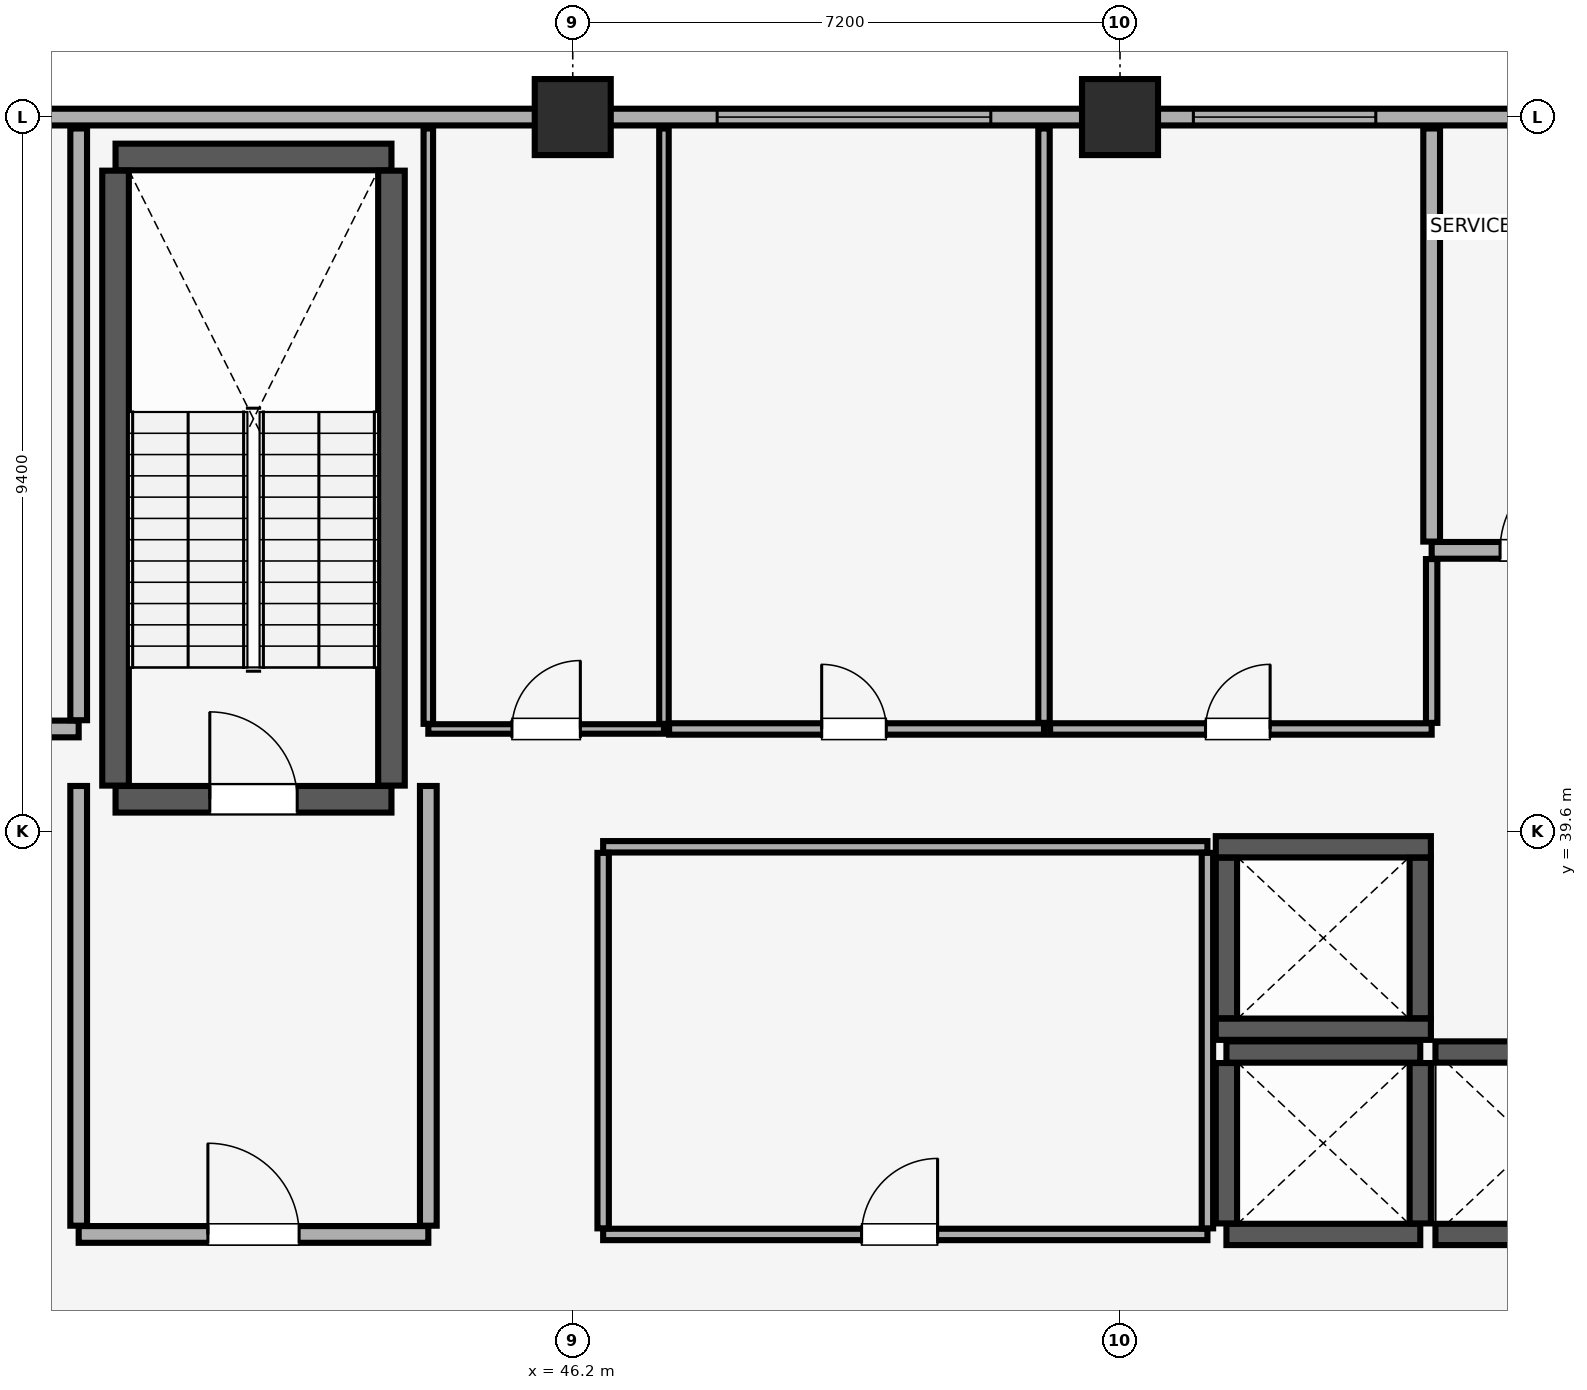
"""IFC4 building model, lengths in metres.
Left out: names, types, materials, properties, quantities, classifications, styles, units other than length and angle.
Written with IfcOpenShell. Run it as: python <this file> out.ifc"""

import sys

from ifc_helpers import new_model, si_unit, direction, frame, frame_2d, origin, origin_2d, place, context, subcontext, project, spatial, rectangle, extrude, element, fill, save


model = new_model("IFC4")
c1 = context("Model", 3, precision=1e-05, world=origin(), true_north=direction((0.0, 1.0)))
c2 = subcontext(c1, "Body", "Model", "MODEL_VIEW")
j1 = project(units=[si_unit("LENGTHUNIT", "METRE"), si_unit("PLANEANGLEUNIT", "RADIAN")], contexts=[c1])
p1 = place(None, origin())
s1 = spatial("IfcSite", under=j1, at=p1, CompositionType="ELEMENT")
p2 = place(p1, origin())
s2 = spatial("IfcBuilding", under=s1, at=p2, CompositionType="ELEMENT")
p3 = place(p2, frame((0.0, 0.0, 285.9)))
s3 = spatial("IfcBuildingStorey", under=s2, at=p3, CompositionType="ELEMENT", Elevation=285.9)
for number, where, z_axis, x_axis in (
    (1, (46.2, 49.0, 0.0), (0.0, 0.0, 1.0), (1.0, 0.0, 0.0)),
    (2, (53.4, 49.0, 0.0), (0.0, 0.0, 1.0), (1.0, 0.0, 0.0)),
):
    element("IfcColumn", number, at=place(p3, frame(where, z_axis=z_axis, x_axis=x_axis)), inside=s3, PredefinedType="COLUMN", context=c2, shape_type="SweptSolid", body=[
        extrude(rectangle(XDim=1.0, YDim=1.0, at=origin_2d()), origin(), (0.0, 0.0, 1.0), 4.1),
    ])
p4 = place(p3, frame((71.4, 49.0, 0.0), z_axis=(0.0, 0.0, 1.0), x_axis=(-1.0, 0.0, 0.0)))
e3 = element("IfcWall", 3, at=p4, inside=s3, PredefinedType="SOLIDWALL", context=c2, shape_type="SweptSolid", body=[
    extrude(rectangle(XDim=58.8, YDim=0.22, at=frame_2d((29.4, 0.0))), origin(), (0.0, 0.0, 1.0), 3.3),
])
p5 = place(p4, frame((56.365, 0.0, 0.85)))
e4 = element("IfcOpeningElement", 4, at=p5, cuts=e3, PredefinedType="OPENING", context=c2, shape_type="SweptSolid", body=[
    extrude(rectangle(XDim=1.5, YDim=1.4, at=frame_2d((0.75, 0.7))), frame((0.0, 0.12, 0.0), z_axis=(0.0, -1.0, 0.0), x_axis=(1.0, 0.0, 0.0)), (0.0, 0.0, 1.0), 0.24),
])
p6 = place(p4, frame((0.935, 0.0, 0.85)))
e5 = element("IfcOpeningElement", 5, at=p6, cuts=e3, PredefinedType="OPENING", context=c2, shape_type="SweptSolid", body=[
    extrude(rectangle(XDim=1.5, YDim=1.4, at=frame_2d((0.75, 0.7))), frame((0.0, 0.12, 0.0), z_axis=(0.0, -1.0, 0.0), x_axis=(1.0, 0.0, 0.0)), (0.0, 0.0, 1.0), 0.24),
])
p7 = place(p4, frame((41.915, 0.0, 0.9)))
e6 = element("IfcOpeningElement", 6, at=p7, cuts=e3, PredefinedType="OPENING", context=c2, shape_type="SweptSolid", body=[
    extrude(rectangle(XDim=3.6, YDim=1.5, at=frame_2d((1.8, 0.75))), frame((0.0, 0.12, 0.0), z_axis=(0.0, -1.0, 0.0), x_axis=(1.0, 0.0, 0.0)), (0.0, 0.0, 1.0), 0.24),
])
p8 = place(p4, frame((36.85, 0.0, 0.9)))
e7 = element("IfcOpeningElement", 7, at=p8, cuts=e3, PredefinedType="OPENING", context=c2, shape_type="SweptSolid", body=[
    extrude(rectangle(XDim=3.0, YDim=1.5, at=frame_2d((1.5, 0.75))), frame((0.0, 0.12, 0.0), z_axis=(0.0, -1.0, 0.0), x_axis=(1.0, 0.0, 0.0)), (0.0, 0.0, 1.0), 0.24),
])
p9 = place(p4, frame((19.7, 0.0, 0.9)))
e8 = element("IfcOpeningElement", 8, at=p9, cuts=e3, PredefinedType="OPENING", context=c2, shape_type="SweptSolid", body=[
    extrude(rectangle(XDim=3.6, YDim=1.5, at=frame_2d((1.8, 0.75))), frame((0.0, 0.12, 0.0), z_axis=(0.0, -1.0, 0.0), x_axis=(1.0, 0.0, 0.0)), (0.0, 0.0, 1.0), 0.24),
])
p10 = place(p4, frame((14.635, 0.0, 0.9)))
e9 = element("IfcOpeningElement", 9, at=p10, cuts=e3, PredefinedType="OPENING", context=c2, shape_type="SweptSolid", body=[
    extrude(rectangle(XDim=2.4, YDim=1.5, at=frame_2d((1.2, 0.75))), frame((0.0, 0.12, 0.0), z_axis=(0.0, -1.0, 0.0), x_axis=(1.0, 0.0, 0.0)), (0.0, 0.0, 1.0), 0.24),
])
p11 = place(p3, frame((40.185, 40.025, 0.0), z_axis=(0.0, 0.0, 1.0), x_axis=(1.0, 0.0, 0.0)))
e10 = element("IfcWall", 10, at=p11, inside=s3, PredefinedType="SHEAR", context=c2, shape_type="SweptSolid", body=[
    extrude(rectangle(XDim=3.63, YDim=0.35, at=frame_2d((1.815, 0.0))), origin(), (0.0, 0.0, 1.0), 4.1),
])
p12 = place(p11, frame((1.24, 0.0, 0.0)))
e11 = element("IfcOpeningElement", 11, at=p12, cuts=e10, PredefinedType="OPENING", context=c2, shape_type="SweptSolid", body=[
    extrude(rectangle(XDim=1.15, YDim=2.15, at=frame_2d((0.575, 1.075))), frame((0.0, 0.185, 0.0), z_axis=(0.0, -1.0, 0.0), x_axis=(1.0, 0.0, 0.0)), (0.0, 0.0, 1.0), 0.37),
])
p13 = place(p3, frame((40.185, 48.475, 0.0), z_axis=(0.0, 0.0, 1.0), x_axis=(1.0, 0.0, 0.0)))
e12 = element("IfcWall", 12, at=p13, inside=s3, PredefinedType="SHEAR", context=c2, shape_type="SweptSolid", body=[
    extrude(rectangle(XDim=3.63, YDim=0.35, at=frame_2d((1.815, 0.0))), origin(), (0.0, 0.0, 1.0), 4.1),
])
for number, where, z_axis, x_axis in (
    (13, (40.185, 40.205, 0.0), (0.0, 0.0, 1.0), (0.0, 1.0, 0.0)),
    (14, (43.815, 40.205, 0.0), (0.0, 0.0, 1.0), (0.0, 1.0, 0.0)),
):
    element("IfcWall", number, at=place(p3, frame(where, z_axis=z_axis, x_axis=x_axis)), inside=s3, PredefinedType="SHEAR", context=c2, shape_type="SweptSolid", body=[
        extrude(rectangle(XDim=8.09, YDim=0.35, at=frame_2d((4.045, 0.0))), origin(), (0.0, 0.0, 1.0), 4.1),
    ])
for number, where, z_axis, x_axis in (
    (15, (54.8, 34.3, 0.0), (0.0, 0.0, 1.0), (1.0, 0.0, 0.0)),
    (16, (54.8, 36.7, 0.0), (0.0, 0.0, 1.0), (1.0, 0.0, 0.0)),
):
    element("IfcWall", number, at=place(p3, frame(where, z_axis=z_axis, x_axis=x_axis)), inside=s3, PredefinedType="SHEAR", context=c2, shape_type="SweptSolid", body=[
        extrude(rectangle(XDim=2.55, YDim=0.28, at=frame_2d((1.275, 0.0))), origin(), (0.0, 0.0, 1.0), 4.1),
    ])
for number, where, z_axis, x_axis in (
    (17, (54.8, 34.445, 0.0), (0.0, 0.0, 1.0), (0.0, 1.0, 0.0)),
    (18, (57.35, 34.445, 0.0), (0.0, 0.0, 1.0), (0.0, 1.0, 0.0)),
):
    element("IfcWall", number, at=place(p3, frame(where, z_axis=z_axis, x_axis=x_axis)), inside=s3, PredefinedType="SHEAR", context=c2, shape_type="SweptSolid", body=[
        extrude(rectangle(XDim=2.11, YDim=0.28, at=frame_2d((1.055, 0.0))), origin(), (0.0, 0.0, 1.0), 4.1),
    ])
for number, where, z_axis, x_axis in (
    (19, (57.55, 34.3, 0.0), (0.0, 0.0, 1.0), (1.0, 0.0, 0.0)),
    (20, (57.55, 36.7, 0.0), (0.0, 0.0, 1.0), (1.0, 0.0, 0.0)),
):
    element("IfcWall", number, at=place(p3, frame(where, z_axis=z_axis, x_axis=x_axis)), inside=s3, PredefinedType="SHEAR", context=c2, shape_type="SweptSolid", body=[
        extrude(rectangle(XDim=2.55, YDim=0.28, at=frame_2d((1.275, 0.0))), origin(), (0.0, 0.0, 1.0), 4.1),
    ])
for number, where, z_axis, x_axis in (
    (21, (54.66, 37.0, 0.0), (0.0, 0.0, 1.0), (1.0, 0.0, 0.0)),
    (22, (54.66, 39.4, 0.0), (0.0, 0.0, 1.0), (1.0, 0.0, 0.0)),
):
    element("IfcWall", number, at=place(p3, frame(where, z_axis=z_axis, x_axis=x_axis)), inside=s3, PredefinedType="SHEAR", context=c2, shape_type="SweptSolid", body=[
        extrude(rectangle(XDim=2.83, YDim=0.28, at=frame_2d((1.415, 0.0))), origin(), (0.0, 0.0, 1.0), 4.1),
    ])
for number, where, z_axis, x_axis in (
    (23, (54.8, 37.145, 0.0), (0.0, 0.0, 1.0), (0.0, 1.0, 0.0)),
    (24, (57.35, 37.145, 0.0), (0.0, 0.0, 1.0), (0.0, 1.0, 0.0)),
):
    element("IfcWall", number, at=place(p3, frame(where, z_axis=z_axis, x_axis=x_axis)), inside=s3, PredefinedType="SHEAR", context=c2, shape_type="SweptSolid", body=[
        extrude(rectangle(XDim=2.11, YDim=0.28, at=frame_2d((1.055, 0.0))), origin(), (0.0, 0.0, 1.0), 4.1),
    ])
p14 = place(p3, frame((39.7, 34.3, 0.0), z_axis=(0.0, 0.0, 1.0), x_axis=(1.0, 0.0, 0.0)))
e25 = element("IfcWall", 25, at=p14, inside=s3, PredefinedType="PARTITIONING", context=c2, shape_type="SweptSolid", body=[
    extrude(rectangle(XDim=4.6, YDim=0.22, at=frame_2d((2.3, 0.0))), origin(), (0.0, 0.0, 1.0), 4.1),
])
p15 = place(p14, frame((1.7, 0.0, 0.0)))
e26 = element("IfcOpeningElement", 26, at=p15, cuts=e25, PredefinedType="OPENING", context=c2, shape_type="SweptSolid", body=[
    extrude(rectangle(XDim=1.2, YDim=2.15, at=frame_2d((0.6, 1.075))), frame((0.0, 0.12, 0.0), z_axis=(0.0, -1.0, 0.0), x_axis=(1.0, 0.0, 0.0)), (0.0, 0.0, 1.0), 0.24),
])
for number, where, z_axis, x_axis in (
    (27, (39.7, 34.415, 0.0), (0.0, 0.0, 1.0), (0.0, 1.0, 0.0)),
    (28, (44.3, 34.415, 0.0), (0.0, 0.0, 1.0), (0.0, 1.0, 0.0)),
):
    element("IfcWall", number, at=place(p3, frame(where, z_axis=z_axis, x_axis=x_axis)), inside=s3, PredefinedType="PARTITIONING", context=c2, shape_type="SweptSolid", body=[
        extrude(rectangle(XDim=5.785, YDim=0.22, at=frame_2d((2.893, 0.0))), origin(), (0.0, 0.0, 1.0), 4.1),
    ])
p16 = place(p3, frame((57.5, 43.3, 0.0), z_axis=(0.0, 0.0, 1.0), x_axis=(1.0, 0.0, 0.0)))
e29 = element("IfcWall", 29, at=p16, inside=s3, PredefinedType="PARTITIONING", context=c2, shape_type="SweptSolid", body=[
    extrude(rectangle(XDim=3.04, YDim=0.22, at=frame_2d((1.52, 0.0))), origin(), (0.0, 0.0, 1.0), 4.1),
])
p17 = place(p16, frame((0.9, 0.0, 0.0)))
e30 = element("IfcOpeningElement", 30, at=p17, cuts=e29, PredefinedType="OPENING", context=c2, shape_type="SweptSolid", body=[
    extrude(rectangle(XDim=1.2, YDim=2.15, at=frame_2d((0.6, 1.075))), frame((0.0, 0.12, 0.0), z_axis=(0.0, -1.0, 0.0), x_axis=(1.0, 0.0, 0.0)), (0.0, 0.0, 1.0), 0.24),
])
p18 = place(p3, frame((57.5, 43.415, 0.0), z_axis=(0.0, 0.0, 1.0), x_axis=(0.0, 1.0, 0.0)))
e31 = element("IfcWall", 31, at=p18, inside=s3, PredefinedType="PARTITIONING", context=c2, shape_type="SweptSolid", body=[
    extrude(rectangle(XDim=5.435, YDim=0.22, at=frame_2d((2.718, 0.0))), origin(), (0.0, 0.0, 1.0), 4.1),
])
p19 = place(p3, frame((46.6, 34.3, 0.0), z_axis=(0.0, 0.0, 1.0), x_axis=(1.0, 0.0, 0.0)))
e32 = element("IfcWall", 32, at=p19, inside=s3, PredefinedType="PARTITIONING", context=c2, shape_type="SweptSolid", body=[
    extrude(rectangle(XDim=7.95, YDim=0.15, at=frame_2d((3.975, 0.0))), origin(), (0.0, 0.0, 1.0), 4.1),
])
p20 = place(p19, frame((3.4, 0.0, 0.0)))
e33 = element("IfcOpeningElement", 33, at=p20, cuts=e32, PredefinedType="OPENING", context=c2, shape_type="SweptSolid", body=[
    extrude(rectangle(XDim=1.0, YDim=2.15, at=frame_2d((0.5, 1.075))), frame((0.0, 0.085, 0.0), z_axis=(0.0, -1.0, 0.0), x_axis=(1.0, 0.0, 0.0)), (0.0, 0.0, 1.0), 0.17),
])
p21 = place(p3, frame((46.6, 39.4, 0.0), z_axis=(0.0, 0.0, 1.0), x_axis=(1.0, 0.0, 0.0)))
e34 = element("IfcWall", 34, at=p21, inside=s3, PredefinedType="PARTITIONING", context=c2, shape_type="SweptSolid", body=[
    extrude(rectangle(XDim=7.95, YDim=0.15, at=frame_2d((3.975, 0.0))), origin(), (0.0, 0.0, 1.0), 4.1),
])
for number, where, z_axis, x_axis in (
    (35, (46.6, 34.38, 0.0), (0.0, 0.0, 1.0), (0.0, 1.0, 0.0)),
    (36, (54.55, 34.38, 0.0), (0.0, 0.0, 1.0), (0.0, 1.0, 0.0)),
):
    element("IfcWall", number, at=place(p3, frame(where, z_axis=z_axis, x_axis=x_axis)), inside=s3, PredefinedType="PARTITIONING", context=c2, shape_type="SweptSolid", body=[
        extrude(rectangle(XDim=4.94, YDim=0.15, at=frame_2d((2.47, 0.0))), origin(), (0.0, 0.0, 1.0), 4.1),
    ])
p22 = place(p3, frame((35.18, 40.95, 0.0), z_axis=(0.0, 0.0, 1.0), x_axis=(1.0, 0.0, 0.0)))
e37 = element("IfcWall", 37, at=p22, inside=s3, PredefinedType="PARTITIONING", context=c2, shape_type="SweptSolid", body=[
    extrude(rectangle(XDim=4.52, YDim=0.22, at=frame_2d((2.26, 0.0))), origin(), (0.0, 0.0, 1.0), 4.1),
])
p23 = place(p22, frame((0.795, 0.0, 0.0)))
e38 = element("IfcOpeningElement", 38, at=p23, cuts=e37, PredefinedType="OPENING", context=c2, shape_type="SweptSolid", body=[
    extrude(rectangle(XDim=0.85, YDim=2.1, at=frame_2d((0.425, 1.05))), frame((0.0, 0.12, 0.0), z_axis=(0.0, -1.0, 0.0), x_axis=(1.0, 0.0, 0.0)), (0.0, 0.0, 1.0), 0.24),
])
p24 = place(p3, frame((39.7, 41.065, 0.0), z_axis=(0.0, 0.0, 1.0), x_axis=(0.0, 1.0, 0.0)))
e39 = element("IfcWall", 39, at=p24, inside=s3, PredefinedType="PARTITIONING", context=c2, shape_type="SweptSolid", body=[
    extrude(rectangle(XDim=7.785, YDim=0.22, at=frame_2d((3.893, 0.0))), origin(), (0.0, 0.0, 1.0), 4.1),
])
p25 = place(p3, frame((44.3, 40.95, 0.0), z_axis=(0.0, 0.0, 1.0), x_axis=(1.0, 0.0, 0.0)))
e40 = element("IfcWall", 40, at=p25, inside=s3, PredefinedType="PARTITIONING", context=c2, shape_type="SweptSolid", body=[
    extrude(rectangle(XDim=3.1, YDim=0.125, at=frame_2d((1.55, 0.0))), origin(), (0.0, 0.0, 1.0), 4.1),
])
p26 = place(p25, frame((1.1, 0.0, 0.0)))
e41 = element("IfcOpeningElement", 41, at=p26, cuts=e40, PredefinedType="OPENING", context=c2, shape_type="SweptSolid", body=[
    extrude(rectangle(XDim=0.9, YDim=2.1, at=frame_2d((0.45, 1.05))), frame((0.0, 0.073, 0.0), z_axis=(0.0, -1.0, 0.0), x_axis=(1.0, 0.0, 0.0)), (0.0, 0.0, 1.0), 0.145),
])
for number, where, z_axis, x_axis in (
    (42, (44.3, 41.018, 0.0), (0.0, 0.0, 1.0), (0.0, 1.0, 0.0)),
    (43, (47.4, 41.018, 0.0), (0.0, 0.0, 1.0), (0.0, 1.0, 0.0)),
):
    element("IfcWall", number, at=place(p3, frame(where, z_axis=z_axis, x_axis=x_axis)), inside=s3, PredefinedType="PARTITIONING", context=c2, shape_type="SweptSolid", body=[
        extrude(rectangle(XDim=7.833, YDim=0.125, at=frame_2d((3.916, 0.0))), origin(), (0.0, 0.0, 1.0), 4.1),
    ])
p27 = place(p3, frame((47.468, 40.95, 0.0), z_axis=(0.0, 0.0, 1.0), x_axis=(1.0, 0.0, 0.0)))
e44 = element("IfcWall", 44, at=p27, inside=s3, PredefinedType="PARTITIONING", context=c2, shape_type="SweptSolid", body=[
    extrude(rectangle(XDim=4.932, YDim=0.15, at=frame_2d((2.466, 0.0))), origin(), (0.0, 0.0, 1.0), 4.1),
])
p28 = place(p27, frame((2.008, 0.0, 0.0)))
e45 = element("IfcOpeningElement", 45, at=p28, cuts=e44, PredefinedType="OPENING", context=c2, shape_type="SweptSolid", body=[
    extrude(rectangle(XDim=0.85, YDim=2.1, at=frame_2d((0.425, 1.05))), frame((0.0, 0.085, 0.0), z_axis=(0.0, -1.0, 0.0), x_axis=(1.0, 0.0, 0.0)), (0.0, 0.0, 1.0), 0.17),
])
p29 = place(p3, frame((52.4, 41.03, 0.0), z_axis=(0.0, 0.0, 1.0), x_axis=(0.0, 1.0, 0.0)))
e46 = element("IfcWall", 46, at=p29, inside=s3, PredefinedType="PARTITIONING", context=c2, shape_type="SweptSolid", body=[
    extrude(rectangle(XDim=7.82, YDim=0.15, at=frame_2d((3.91, 0.0))), origin(), (0.0, 0.0, 1.0), 4.1),
])
p30 = place(p3, frame((52.48, 40.95, 0.0), z_axis=(0.0, 0.0, 1.0), x_axis=(1.0, 0.0, 0.0)))
e47 = element("IfcWall", 47, at=p30, inside=s3, PredefinedType="PARTITIONING", context=c2, shape_type="SweptSolid", body=[
    extrude(rectangle(XDim=5.02, YDim=0.15, at=frame_2d((2.51, 0.0))), origin(), (0.0, 0.0, 1.0), 4.1),
])
p31 = place(p30, frame((2.045, 0.0, 0.0)))
e48 = element("IfcOpeningElement", 48, at=p31, cuts=e47, PredefinedType="OPENING", context=c2, shape_type="SweptSolid", body=[
    extrude(rectangle(XDim=0.85, YDim=2.1, at=frame_2d((0.425, 1.05))), frame((0.0, 0.085, 0.0), z_axis=(0.0, -1.0, 0.0), x_axis=(1.0, 0.0, 0.0)), (0.0, 0.0, 1.0), 0.17),
])
p32 = place(p3, frame((57.5, 41.03, 0.0), z_axis=(0.0, 0.0, 1.0), x_axis=(0.0, 1.0, 0.0)))
e49 = element("IfcWall", 49, at=p32, inside=s3, PredefinedType="PARTITIONING", context=c2, shape_type="SweptSolid", body=[
    extrude(rectangle(XDim=2.155, YDim=0.15, at=frame_2d((1.078, 0.0))), origin(), (0.0, 0.0, 1.0), 4.1),
])
p33 = place(p9, origin())
e50 = element("IfcWindow", 50, at=p33, inside=s3, PartitioningType="SINGLE_PANEL", PredefinedType="WINDOW", context=c2, shape_type="SweptSolid", body=[
    extrude(rectangle(XDim=3.6, YDim=1.5, at=frame_2d((1.8, 0.75))), frame((0.0, 0.03, 0.0), z_axis=(0.0, -1.0, 0.0), x_axis=(1.0, 0.0, 0.0)), (0.0, 0.0, 1.0), 0.06),
])
fill(e8, e50)
p34 = place(p10, origin())
e51 = element("IfcWindow", 51, at=p34, inside=s3, PartitioningType="SINGLE_PANEL", PredefinedType="WINDOW", context=c2, shape_type="SweptSolid", body=[
    extrude(rectangle(XDim=2.4, YDim=1.5, at=frame_2d((1.2, 0.75))), frame((0.0, 0.03, 0.0), z_axis=(0.0, -1.0, 0.0), x_axis=(1.0, 0.0, 0.0)), (0.0, 0.0, 1.0), 0.06),
])
fill(e9, e51)
p35 = place(p12, origin())
e52 = element("IfcDoor", 52, at=p35, inside=s3, OperationType="SINGLE_SWING_LEFT", PredefinedType="DOOR", context=c2, shape_type="SweptSolid", body=[
    extrude(rectangle(XDim=1.15, YDim=2.15, at=frame_2d((0.575, 1.075))), frame((0.0, 0.025, 0.0), z_axis=(0.0, -1.0, 0.0), x_axis=(1.0, 0.0, 0.0)), (0.0, 0.0, 1.0), 0.05),
])
fill(e11, e52)
p36 = place(p15, origin())
e53 = element("IfcDoor", 53, at=p36, inside=s3, OperationType="SINGLE_SWING_LEFT", PredefinedType="DOOR", context=c2, shape_type="SweptSolid", body=[
    extrude(rectangle(XDim=1.2, YDim=2.15, at=frame_2d((0.6, 1.075))), frame((0.0, 0.025, 0.0), z_axis=(0.0, -1.0, 0.0), x_axis=(1.0, 0.0, 0.0)), (0.0, 0.0, 1.0), 0.05),
])
fill(e26, e53)
p37 = place(p17, origin())
e54 = element("IfcDoor", 54, at=p37, inside=s3, OperationType="SINGLE_SWING_RIGHT", PredefinedType="DOOR", context=c2, shape_type="SweptSolid", body=[
    extrude(rectangle(XDim=1.2, YDim=2.15, at=frame_2d((0.6, 1.075))), frame((0.0, 0.025, 0.0), z_axis=(0.0, -1.0, 0.0), x_axis=(1.0, 0.0, 0.0)), (0.0, 0.0, 1.0), 0.05),
])
fill(e30, e54)
p38 = place(p20, origin())
e55 = element("IfcDoor", 55, at=p38, inside=s3, OperationType="SINGLE_SWING_RIGHT", PredefinedType="DOOR", context=c2, shape_type="SweptSolid", body=[
    extrude(rectangle(XDim=1.0, YDim=2.15, at=frame_2d((0.5, 1.075))), frame((0.0, 0.025, 0.0), z_axis=(0.0, -1.0, 0.0), x_axis=(1.0, 0.0, 0.0)), (0.0, 0.0, 1.0), 0.05),
])
fill(e33, e55)
p39 = place(p26, origin())
e56 = element("IfcDoor", 56, at=p39, inside=s3, OperationType="SINGLE_SWING_RIGHT", PredefinedType="DOOR", context=c2, shape_type="SweptSolid", body=[
    extrude(rectangle(XDim=0.9, YDim=2.1, at=frame_2d((0.45, 1.05))), frame((0.0, 0.025, 0.0), z_axis=(0.0, -1.0, 0.0), x_axis=(1.0, 0.0, 0.0)), (0.0, 0.0, 1.0), 0.05),
])
fill(e41, e56)
p40 = place(p28, origin())
e57 = element("IfcDoor", 57, at=p40, inside=s3, OperationType="SINGLE_SWING_LEFT", PredefinedType="DOOR", context=c2, shape_type="SweptSolid", body=[
    extrude(rectangle(XDim=0.85, YDim=2.1, at=frame_2d((0.425, 1.05))), frame((0.0, 0.025, 0.0), z_axis=(0.0, -1.0, 0.0), x_axis=(1.0, 0.0, 0.0)), (0.0, 0.0, 1.0), 0.05),
])
fill(e45, e57)
p41 = place(p31, origin())
e58 = element("IfcDoor", 58, at=p41, inside=s3, OperationType="SINGLE_SWING_RIGHT", PredefinedType="DOOR", context=c2, shape_type="SweptSolid", body=[
    extrude(rectangle(XDim=0.85, YDim=2.1, at=frame_2d((0.425, 1.05))), frame((0.0, 0.025, 0.0), z_axis=(0.0, -1.0, 0.0), x_axis=(1.0, 0.0, 0.0)), (0.0, 0.0, 1.0), 0.05),
])
fill(e48, e58)
save(model, sys.argv[1])
